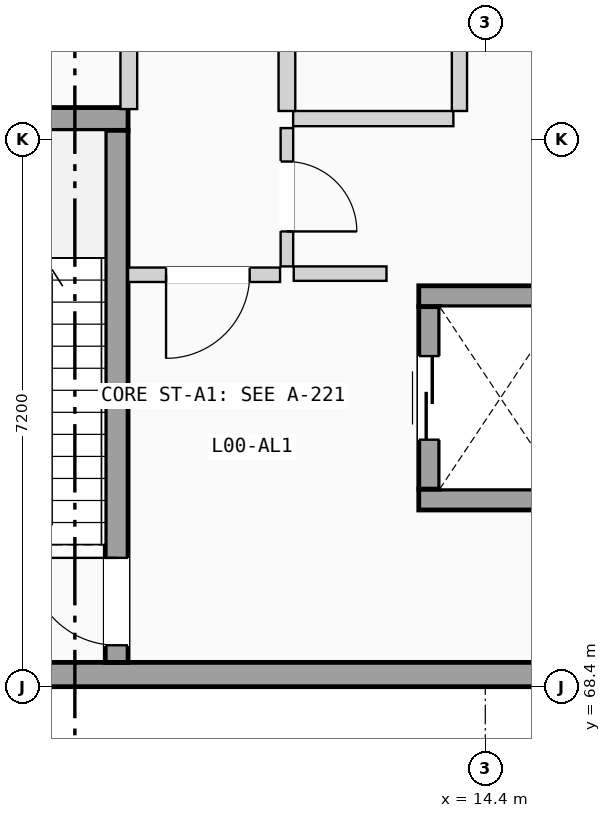
"""IFC4 building model, lengths in metres.
Left out: names, types, materials, properties, quantities, classifications, styles, units other than length and angle.
Written with IfcOpenShell. Run it as: python <this file> out.ifc"""

import sys

from ifc_helpers import new_model, si_unit, direction, frame, frame_2d, origin, place, context, subcontext, project, spatial, rectangle, extrude, element, fill, save


model = new_model("IFC4")
c1 = context("Model", 3, precision=1e-05, world=origin(), true_north=direction((0.0, 1.0)))
c2 = subcontext(c1, "Body", "Model", "MODEL_VIEW")
j1 = project(units=[si_unit("LENGTHUNIT", "METRE"), si_unit("PLANEANGLEUNIT", "RADIAN")], contexts=[c1])
p1 = place(None, origin())
s1 = spatial("IfcSite", under=j1, at=p1, CompositionType="ELEMENT")
p2 = place(p1, origin())
s2 = spatial("IfcBuilding", under=s1, at=p2, CompositionType="ELEMENT")
p3 = place(p2, origin())
s3 = spatial("IfcBuildingStorey", under=s2, at=p3, CompositionType="ELEMENT", Elevation=0.0)
p4 = place(p3, frame((0.0, 68.56, 0.0), z_axis=(0.0, 0.0, 1.0), x_axis=(1.0, 0.0, 0.0)))
e1 = element("IfcWall", 1, at=p4, inside=s3, PredefinedType="SOLIDWALL", context=c2, shape_type="SweptSolid", body=[
    extrude(rectangle(XDim=21.6, YDim=0.32, at=frame_2d((10.8, 0.0))), origin(), (0.0, 0.0, 1.0), 4.64),
])
p5 = place(p4, frame((7.25, 0.0, 0.0)))
e2 = element("IfcOpeningElement", 2, at=p5, cuts=e1, PredefinedType="OPENING", context=c2, shape_type="SweptSolid", body=[
    extrude(rectangle(XDim=1.3, YDim=2.2, at=frame_2d((0.65, 1.1))), frame((0.0, 0.17, 0.0), z_axis=(0.0, -1.0, 0.0), x_axis=(1.0, 0.0, 0.0)), (0.0, 0.0, 1.0), 0.34),
])
p6 = place(p3, frame((5.775, 75.87, 0.0), z_axis=(0.0, 0.0, 1.0), x_axis=(1.0, 0.0, 0.0)))
e3 = element("IfcWall", 3, at=p6, inside=s3, PredefinedType="SHEAR", context=c2, shape_type="SweptSolid", body=[
    extrude(rectangle(XDim=3.925, YDim=0.3, at=frame_2d((1.962, 0.0))), origin(), (0.0, 0.0, 1.0), 4.64),
])
p7 = place(p3, frame((9.55, 68.72, 0.0), z_axis=(0.0, 0.0, 1.0), x_axis=(0.0, 1.0, 0.0)))
e4 = element("IfcWall", 4, at=p7, inside=s3, PredefinedType="SHEAR", context=c2, shape_type="SweptSolid", body=[
    extrude(rectangle(XDim=7.0, YDim=0.3, at=frame_2d((3.5, 0.0))), origin(), (0.0, 0.0, 1.0), 4.64),
])
p8 = place(p7, frame((0.225, 0.0, 0.0)))
e5 = element("IfcOpeningElement", 5, at=p8, cuts=e4, PredefinedType="OPENING", context=c2, shape_type="SweptSolid", body=[
    extrude(rectangle(XDim=1.15, YDim=2.12, at=frame_2d((0.575, 1.06))), frame((0.0, 0.16, 0.0), z_axis=(0.0, -1.0, 0.0), x_axis=(1.0, 0.0, 0.0)), (0.0, 0.0, 1.0), 0.32),
])
for number, where, z_axis, x_axis in (
    (6, (13.525, 70.863, 0.0), (0.0, 0.0, 1.0), (1.0, 0.0, 0.0)),
    (7, (13.525, 73.538, 0.0), (0.0, 0.0, 1.0), (1.0, 0.0, 0.0)),
):
    element("IfcWall", number, at=place(p3, frame(where, z_axis=z_axis, x_axis=x_axis)), inside=s3, PredefinedType="SHEAR", context=c2, shape_type="SweptSolid", body=[
        extrude(rectangle(XDim=2.15, YDim=0.275, at=frame_2d((1.075, 0.0))), origin(), (0.0, 0.0, 1.0), 4.64),
    ])
p9 = place(p3, frame((13.663, 71.0, 0.0), z_axis=(0.0, 0.0, 1.0), x_axis=(0.0, 1.0, 0.0)))
e8 = element("IfcWall", 8, at=p9, inside=s3, PredefinedType="SHEAR", context=c2, shape_type="SweptSolid", body=[
    extrude(rectangle(XDim=2.4, YDim=0.275, at=frame_2d((1.2, 0.0))), origin(), (0.0, 0.0, 1.0), 4.64),
])
p10 = place(p9, frame((0.65, 0.0, 0.0)))
e9 = element("IfcOpeningElement", 9, at=p10, cuts=e8, PredefinedType="OPENING", context=c2, shape_type="SweptSolid", body=[
    extrude(rectangle(XDim=1.1, YDim=2.15, at=frame_2d((0.55, 1.075))), frame((0.0, 0.147, 0.0), z_axis=(0.0, -1.0, 0.0), x_axis=(1.0, 0.0, 0.0)), (0.0, 0.0, 1.0), 0.295),
])
p11 = place(p3, frame((11.88, 73.835, 0.0), z_axis=(0.0, 0.0, 1.0), x_axis=(1.0, 0.0, 0.0)))
e10 = element("IfcWall", 10, at=p11, inside=s3, PredefinedType="PARTITIONING", context=c2, shape_type="SweptSolid", body=[
    extrude(rectangle(XDim=1.22, YDim=0.19, at=frame_2d((0.61, 0.0))), origin(), (0.0, 0.0, 1.0), 3.84),
])
p12 = place(p3, frame((9.7, 73.82, 0.0), z_axis=(0.0, 0.0, 1.0), x_axis=(1.0, 0.0, 0.0)))
e11 = element("IfcWall", 11, at=p12, inside=s3, PredefinedType="PARTITIONING", context=c2, shape_type="SweptSolid", body=[
    extrude(rectangle(XDim=2.0, YDim=0.19, at=frame_2d((1.0, 0.0))), origin(), (0.0, 0.0, 1.0), 3.84),
])
p13 = place(p12, frame((0.5, 0.0, 0.0)))
e12 = element("IfcOpeningElement", 12, at=p13, cuts=e11, PredefinedType="OPENING", context=c2, shape_type="SweptSolid", body=[
    extrude(rectangle(XDim=1.1, YDim=2.12, at=frame_2d((0.55, 1.06))), frame((0.0, 0.105, 0.0), z_axis=(0.0, -1.0, 0.0), x_axis=(1.0, 0.0, 0.0)), (0.0, 0.0, 1.0), 0.21),
])
p14 = place(p3, frame((11.79, 73.93, 0.0), z_axis=(0.0, 0.0, 1.0), x_axis=(0.0, 1.0, 0.0)))
e13 = element("IfcWall", 13, at=p14, inside=s3, PredefinedType="PARTITIONING", context=c2, shape_type="SweptSolid", body=[
    extrude(rectangle(XDim=1.82, YDim=0.165, at=frame_2d((0.91, 0.0))), origin(), (0.0, 0.0, 1.0), 3.84),
])
p15 = place(p14, frame((0.46, 0.0, 0.0)))
e14 = element("IfcOpeningElement", 14, at=p15, cuts=e13, PredefinedType="OPENING", context=c2, shape_type="SweptSolid", body=[
    extrude(rectangle(XDim=0.92, YDim=2.04, at=frame_2d((0.46, 1.02))), frame((0.0, 0.093, 0.0), z_axis=(0.0, -1.0, 0.0), x_axis=(1.0, 0.0, 0.0)), (0.0, 0.0, 1.0), 0.185),
])
p16 = place(p3, frame((11.872, 75.875, 0.0), z_axis=(0.0, 0.0, 1.0), x_axis=(1.0, 0.0, 0.0)))
e15 = element("IfcWall", 15, at=p16, inside=s3, PredefinedType="PLUMBINGWALL", context=c2, shape_type="SweptSolid", body=[
    extrude(rectangle(XDim=2.108, YDim=0.2, at=frame_2d((1.054, 0.0))), origin(), (0.0, 0.0, 1.0), 3.84),
])
p17 = place(p3, frame((9.71, 76.0, 0.0), z_axis=(0.0, 0.0, 1.0), x_axis=(0.0, 1.0, 0.0)))
e16 = element("IfcWall", 16, at=p17, inside=s3, PredefinedType="PLUMBINGWALL", context=c2, shape_type="SweptSolid", body=[
    extrude(rectangle(XDim=4.039, YDim=0.22, at=frame_2d((2.02, 0.0))), origin(), (0.0, 0.0, 1.0), 3.84),
])
p18 = place(p3, frame((11.79, 75.975, 0.0), z_axis=(0.0, 0.0, 1.0), x_axis=(0.0, 1.0, 0.0)))
e17 = element("IfcWall", 17, at=p18, inside=s3, PredefinedType="PLUMBINGWALL", context=c2, shape_type="SweptSolid", body=[
    extrude(rectangle(XDim=4.064, YDim=0.22, at=frame_2d((2.032, 0.0))), origin(), (0.0, 0.0, 1.0), 3.84),
])
p19 = place(p3, frame((14.06, 75.975, 0.0), z_axis=(0.0, 0.0, 1.0), x_axis=(0.0, 1.0, 0.0)))
e18 = element("IfcWall", 18, at=p19, inside=s3, PredefinedType="PLUMBINGWALL", context=c2, shape_type="SweptSolid", body=[
    extrude(rectangle(XDim=4.064, YDim=0.2, at=frame_2d((2.032, 0.0))), origin(), (0.0, 0.0, 1.0), 3.84),
])
p20 = place(p8, origin())
e19 = element("IfcDoor", 19, at=p20, inside=s3, OperationType="SINGLE_SWING_RIGHT", PredefinedType="DOOR", context=c2, shape_type="SweptSolid", body=[
    extrude(rectangle(XDim=1.15, YDim=2.12, at=frame_2d((0.575, 1.06))), frame((0.0, 0.025, 0.0), z_axis=(0.0, -1.0, 0.0), x_axis=(1.0, 0.0, 0.0)), (0.0, 0.0, 1.0), 0.05),
])
fill(e5, e19)
p21 = place(p10, origin())
e20 = element("IfcDoor", 20, at=p21, inside=s3, OperationType="SLIDING_TO_LEFT", PredefinedType="DOOR", context=c2, shape_type="SweptSolid", body=[
    extrude(rectangle(XDim=1.1, YDim=2.15, at=frame_2d((0.55, 1.075))), frame((0.0, 0.025, 0.0), z_axis=(0.0, -1.0, 0.0), x_axis=(1.0, 0.0, 0.0)), (0.0, 0.0, 1.0), 0.05),
])
fill(e9, e20)
p22 = place(p13, frame((1.1, 0.0, 0.0), z_axis=(0.0, 0.0, 1.0), x_axis=(-1.0, 0.0, 0.0)))
e21 = element("IfcDoor", 21, at=p22, inside=s3, OperationType="SINGLE_SWING_LEFT", PredefinedType="DOOR", context=c2, shape_type="SweptSolid", body=[
    extrude(rectangle(XDim=1.1, YDim=2.12, at=frame_2d((0.55, 1.06))), frame((0.0, 0.025, 0.0), z_axis=(0.0, -1.0, 0.0), x_axis=(1.0, 0.0, 0.0)), (0.0, 0.0, 1.0), 0.05),
])
fill(e12, e21)
p23 = place(p15, frame((0.92, 0.0, 0.0), z_axis=(0.0, 0.0, 1.0), x_axis=(-1.0, 0.0, 0.0)))
e22 = element("IfcDoor", 22, at=p23, inside=s3, OperationType="SINGLE_SWING_LEFT", PredefinedType="DOOR", context=c2, shape_type="SweptSolid", body=[
    extrude(rectangle(XDim=0.92, YDim=2.04, at=frame_2d((0.46, 1.02))), frame((0.0, 0.025, 0.0), z_axis=(0.0, -1.0, 0.0), x_axis=(1.0, 0.0, 0.0)), (0.0, 0.0, 1.0), 0.05),
])
fill(e14, e22)
save(model, sys.argv[1])
